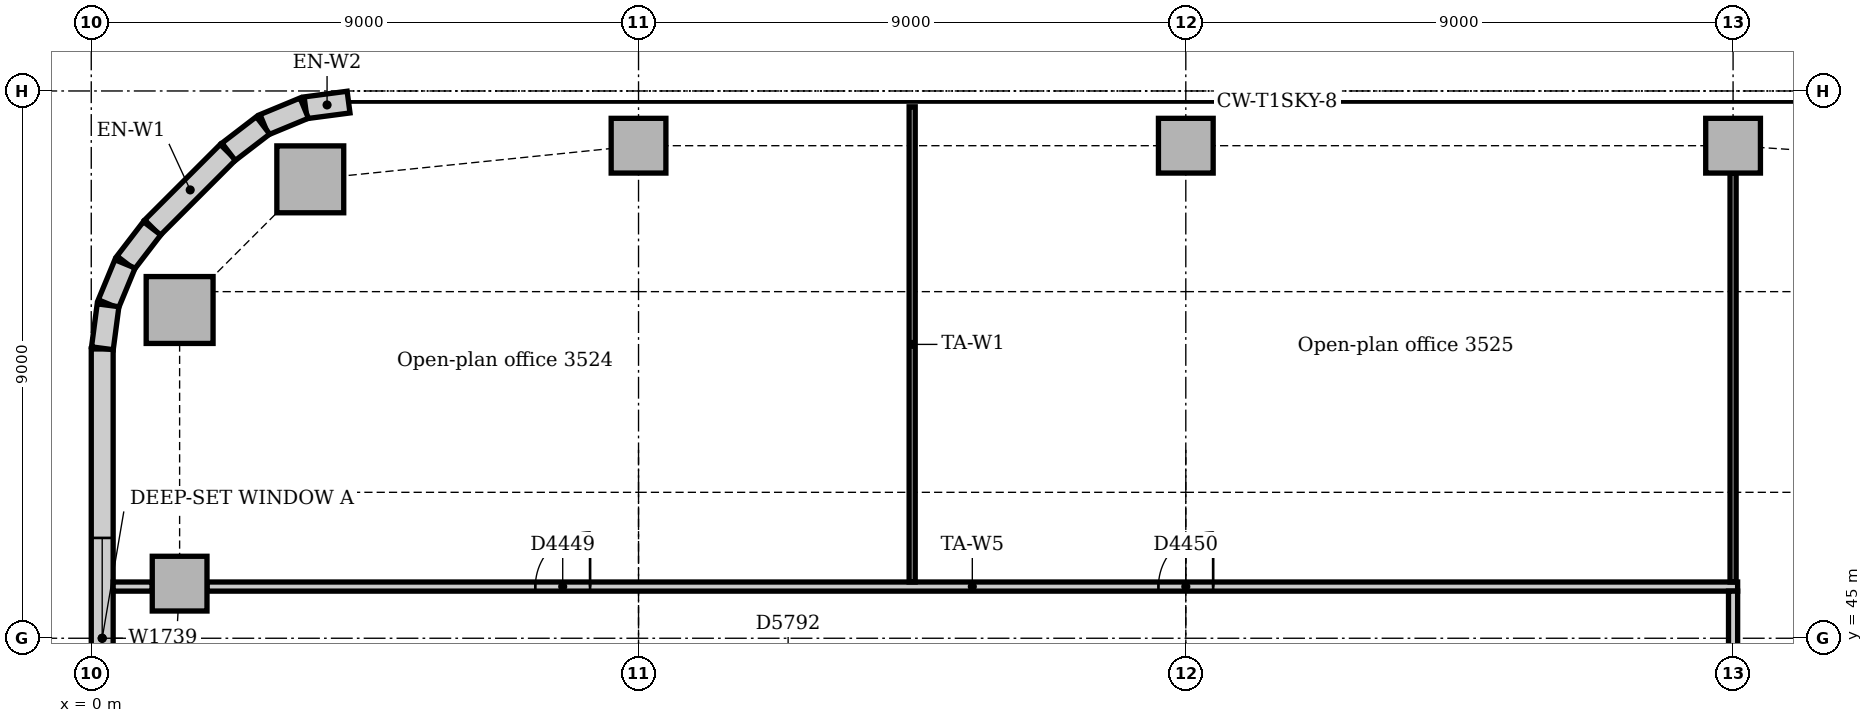
"""IFC4 building model, lengths in metres.
Left out: names, types, materials, properties, quantities, classifications, styles, units other than length and angle.
Written with IfcOpenShell. Run it as: python <this file> out.ifc"""

import sys

from ifc_helpers import new_model, si_unit, direction, frame, frame_2d, origin, origin_2d, place, context, subcontext, project, spatial, rectangle, extrude, element, fill, save


model = new_model("IFC4")
c1 = context("Model", 3, precision=1e-05, world=origin(), true_north=direction((0.0, 1.0)))
c2 = subcontext(c1, "Body", "Model", "MODEL_VIEW")
j1 = project(units=[si_unit("LENGTHUNIT", "METRE"), si_unit("PLANEANGLEUNIT", "RADIAN")], contexts=[c1])
p1 = place(None, origin())
s1 = spatial("IfcSite", under=j1, at=p1, CompositionType="ELEMENT")
p2 = place(p1, origin())
s2 = spatial("IfcBuilding", under=s1, at=p2, CompositionType="ELEMENT")
p3 = place(p2, frame((0.0, 0.0, 149.0)))
s3 = spatial("IfcBuildingStorey", under=s2, at=p3, CompositionType="ELEMENT", Elevation=149.0)
for number, where, z_axis, x_axis in (
    (1, (3.602, 52.547, -0.15), (0.0, 0.0, 1.0), (1.0, 0.0, 0.0)),
    (2, (1.453, 50.398, -0.15), (0.0, 0.0, 1.0), (1.0, 0.0, 0.0)),
):
    element("IfcColumn", number, at=place(p3, frame(where, z_axis=z_axis, x_axis=x_axis)), inside=s3, PredefinedType="COLUMN", context=c2, shape_type="SweptSolid", body=[
        extrude(rectangle(XDim=1.1, YDim=1.1, at=origin_2d()), origin(), (0.0, 0.0, 1.0), 4.0),
    ])
for number, where, z_axis, x_axis in (
    (3, (9.0, 53.1, -0.15), (0.0, 0.0, 1.0), (1.0, 0.0, 0.0)),
    (4, (18.0, 53.1, -0.15), (0.0, 0.0, 1.0), (1.0, 0.0, 0.0)),
    (5, (27.0, 53.1, -0.15), (0.0, 0.0, 1.0), (1.0, 0.0, 0.0)),
):
    element("IfcColumn", number, at=place(p3, frame(where, z_axis=z_axis, x_axis=x_axis)), inside=s3, PredefinedType="COLUMN", context=c2, shape_type="SweptSolid", body=[
        extrude(rectangle(XDim=0.9, YDim=0.9, at=origin_2d()), origin(), (0.0, 0.0, 1.0), 4.0),
    ])
p4 = place(p3, frame((1.453, 45.898, 0.0), z_axis=(0.0, 0.0, 1.0), x_axis=(1.0, 0.0, 0.0)))
e6 = element("IfcColumn", 6, at=p4, inside=s3, PredefinedType="COLUMN", context=c2, shape_type="SweptSolid", body=[
    extrude(rectangle(XDim=0.9, YDim=0.9, at=origin_2d()), origin(), (0.0, 0.0, 1.0), 3.85),
])
p5 = place(p3, frame((2.249, 52.994, 0.0), z_axis=(0.0, 0.0, 1.0), x_axis=(-0.707106781187, -0.707106781187, 0.0)))
e7 = element("IfcWall", 7, at=p5, inside=s3, PredefinedType="STANDARD", context=c2, shape_type="SweptSolid", body=[
    extrude(rectangle(XDim=1.757, YDim=0.36, at=frame_2d((0.879, 0.0))), origin(), (0.0, 0.0, 1.0), 3.85),
])
p6 = place(p3, frame((0.18, 49.757, 0.0), z_axis=(0.0, 0.0, 1.0), x_axis=(0.0, -1.0, 0.0)))
e8 = element("IfcWall", 8, at=p6, inside=s3, PredefinedType="STANDARD", context=c2, shape_type="SweptSolid", body=[
    extrude(rectangle(XDim=7.757, YDim=0.36, at=frame_2d((3.879, 0.0))), origin(), (0.0, 0.0, 1.0), 3.85),
])
p7 = place(p6, frame((3.107, 0.0, 0.9)))
e9 = element("IfcOpeningElement", 9, at=p7, cuts=e8, PredefinedType="OPENING", context=c2, shape_type="SweptSolid", body=[
    extrude(rectangle(XDim=3.3, YDim=1.6, at=frame_2d((1.65, 0.8))), frame((0.0, 0.19, 0.0), z_axis=(0.0, -1.0, 0.0), x_axis=(1.0, 0.0, 0.0)), (0.0, 0.0, 1.0), 0.38),
])
for number, where, z_axis, x_axis in (
    (10, (4.231, 53.817, 0.0), (0.0, 0.0, 1.0), (-0.991, -0.131, 0.0)),
    (11, (3.503, 53.718, 0.0), (0.0, 0.0, 1.0), (-0.924, -0.383, 0.0)),
):
    element("IfcWall", number, at=place(p3, frame(where, z_axis=z_axis, x_axis=x_axis)), inside=s3, PredefinedType="STANDARD", context=c2, shape_type="SweptSolid", body=[
        extrude(rectangle(XDim=0.713, YDim=0.36, at=frame_2d((0.356, 0.0))), origin(), (0.0, 0.0, 1.0), 3.85),
    ])
for number, where, z_axis, x_axis in (
    (12, (2.825, 53.434, 0.0), (0.0, 0.0, 1.0), (-0.793, -0.609, 0.0)),
    (13, (1.0, 51.741, 0.0), (0.0, 0.0, 1.0), (-0.609, -0.793, 0.0)),
):
    element("IfcWall", number, at=place(p3, frame(where, z_axis=z_axis, x_axis=x_axis)), inside=s3, PredefinedType="STANDARD", context=c2, shape_type="SweptSolid", body=[
        extrude(rectangle(XDim=0.713, YDim=0.36, at=frame_2d((0.357, 0.0))), origin(), (0.0, 0.0, 1.0), 3.85),
    ])
for number, where, z_axis, x_axis in (
    (14, (0.555, 51.156, 0.0), (0.0, 0.0, 1.0), (-0.383, -0.924, 0.0)),
    (15, (0.276, 50.476, 0.0), (0.0, 0.0, 1.0), (-0.131, -0.991, 0.0)),
):
    element("IfcWall", number, at=place(p3, frame(where, z_axis=z_axis, x_axis=x_axis)), inside=s3, PredefinedType="STANDARD", context=c2, shape_type="SweptSolid", body=[
        extrude(rectangle(XDim=0.713, YDim=0.36, at=frame_2d((0.356, 0.0))), origin(), (0.0, 0.0, 1.0), 3.85),
    ])
p8 = place(p3, frame((1.903, 45.85, 0.0), z_axis=(0.0, 0.0, 1.0), x_axis=(1.0, 0.0, 0.0)))
e16 = element("IfcWall", 16, at=p8, inside=s3, PredefinedType="PARTITIONING", context=c2, shape_type="SweptSolid", body=[
    extrude(rectangle(XDim=25.172, YDim=0.15, at=frame_2d((12.586, 0.0))), origin(), (0.0, 0.0, 1.0), 3.85),
])
p9 = place(p8, frame((5.4, 0.0, 0.0)))
e17 = element("IfcOpeningElement", 17, at=p9, cuts=e16, PredefinedType="OPENING", context=c2, shape_type="SweptSolid", body=[
    extrude(rectangle(XDim=0.9, YDim=2.1, at=frame_2d((0.45, 1.05))), frame((0.0, 0.085, 0.0), z_axis=(0.0, -1.0, 0.0), x_axis=(1.0, 0.0, 0.0)), (0.0, 0.0, 1.0), 0.17),
])
p10 = place(p8, frame((15.647, 0.0, 0.0)))
e18 = element("IfcOpeningElement", 18, at=p10, cuts=e16, PredefinedType="OPENING", context=c2, shape_type="SweptSolid", body=[
    extrude(rectangle(XDim=0.9, YDim=2.1, at=frame_2d((0.45, 1.05))), frame((0.0, 0.085, 0.0), z_axis=(0.0, -1.0, 0.0), x_axis=(1.0, 0.0, 0.0)), (0.0, 0.0, 1.0), 0.17),
])
p11 = place(p3, frame((0.36, 45.85, 0.0), z_axis=(0.0, 0.0, 1.0), x_axis=(1.0, 0.0, 0.0)))
e19 = element("IfcWall", 19, at=p11, inside=s3, PredefinedType="PARTITIONING", context=c2, shape_type="SweptSolid", body=[
    extrude(rectangle(XDim=0.643, YDim=0.15, at=frame_2d((0.322, 0.0))), origin(), (0.0, 0.0, 1.0), 3.85),
])
p12 = place(p3, frame((27.0, 44.55, 0.0), z_axis=(0.0, 0.0, 1.0), x_axis=(0.0, 1.0, 0.0)))
e20 = element("IfcWall", 20, at=p12, inside=s3, PredefinedType="PARTITIONING", context=c2, shape_type="SweptSolid", body=[
    extrude(rectangle(XDim=1.225, YDim=0.15, at=frame_2d((0.613, 0.0))), origin(), (0.0, 0.0, 1.0), 3.362),
])
p13 = place(p3, frame((13.5, 45.925, 0.0), z_axis=(0.0, 0.0, 1.0), x_axis=(0.0, 1.0, 0.0)))
e21 = element("IfcWall", 21, at=p13, inside=s3, PredefinedType="PARTITIONING", context=c2, shape_type="SweptSolid", body=[
    extrude(rectangle(XDim=7.815, YDim=0.1, at=frame_2d((3.908, 0.0))), origin(), (0.0, 0.0, 1.0), 3.85),
])
p14 = place(p3, frame((27.0, 45.925, 0.0), z_axis=(0.0, 0.0, 1.0), x_axis=(0.0, 1.0, 0.0)))
e22 = element("IfcWall", 22, at=p14, inside=s3, PredefinedType="PARTITIONING", context=c2, shape_type="SweptSolid", body=[
    extrude(rectangle(XDim=6.725, YDim=0.1, at=frame_2d((3.362, 0.0))), origin(), (0.0, 0.0, 1.0), 3.362),
])
p15 = place(p7, origin())
e23 = element("IfcWindow", 23, at=p15, inside=s3, PartitioningType="SINGLE_PANEL", PredefinedType="WINDOW", context=c2, shape_type="SweptSolid", body=[
    extrude(rectangle(XDim=3.3, YDim=1.6, at=frame_2d((1.65, 0.8))), frame((0.0, 0.13, 0.0), z_axis=(0.0, -1.0, 0.0), x_axis=(1.0, 0.0, 0.0)), (0.0, 0.0, 1.0), 0.06),
])
fill(e9, e23)
p16 = place(p9, origin())
e24 = element("IfcDoor", 24, at=p16, inside=s3, OperationType="SINGLE_SWING_RIGHT", PredefinedType="DOOR", context=c2, shape_type="SweptSolid", body=[
    extrude(rectangle(XDim=0.9, YDim=2.1, at=frame_2d((0.45, 1.05))), frame((0.0, 0.025, 0.0), z_axis=(0.0, -1.0, 0.0), x_axis=(1.0, 0.0, 0.0)), (0.0, 0.0, 1.0), 0.05),
])
fill(e17, e24)
p17 = place(p10, origin())
e25 = element("IfcDoor", 25, at=p17, inside=s3, OperationType="SINGLE_SWING_RIGHT", PredefinedType="DOOR", context=c2, shape_type="SweptSolid", body=[
    extrude(rectangle(XDim=0.9, YDim=2.1, at=frame_2d((0.45, 1.05))), frame((0.0, 0.025, 0.0), z_axis=(0.0, -1.0, 0.0), x_axis=(1.0, 0.0, 0.0)), (0.0, 0.0, 1.0), 0.05),
])
fill(e18, e25)
save(model, sys.argv[1])
